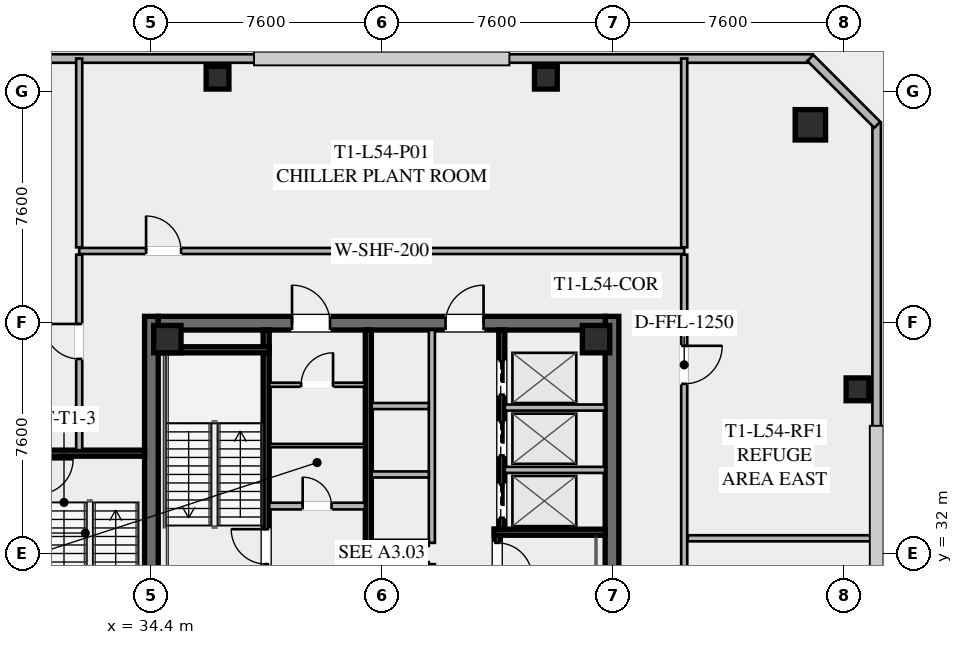
"""IFC4 building model, lengths in metres.
Left out: names, types, materials, properties, quantities, classifications, styles, units other than length and angle.
Written with IfcOpenShell. Run it as: python <this file> out.ifc"""

import sys

from ifc_helpers import new_model, si_unit, direction, frame, frame_2d, origin, origin_2d, place, context, subcontext, project, spatial, rectangle, hollow_rectangle, extrude, element, fill, save


model = new_model("IFC4")
c1 = context("Model", 3, precision=1e-05, world=origin(), true_north=direction((0.0, 1.0)))
c2 = subcontext(c1, "Body", "Model", "MODEL_VIEW")
j1 = project(units=[si_unit("LENGTHUNIT", "METRE"), si_unit("PLANEANGLEUNIT", "RADIAN")], contexts=[c1])
p1 = place(None, origin())
s1 = spatial("IfcSite", under=j1, at=p1, CompositionType="ELEMENT")
p2 = place(p1, origin())
s2 = spatial("IfcBuilding", under=s1, at=p2, CompositionType="ELEMENT")
p3 = place(p2, frame((0.0, 0.0, 199.6)))
s3 = spatial("IfcBuildingStorey", under=s2, at=p3, CompositionType="ELEMENT", Elevation=199.6)
for number, where, z_axis, x_axis in (
    (1, (34.425, 24.2, 0.0), (0.0, 0.0, 1.0), (0.0, 1.0, 0.0)),
    (2, (49.575, 39.8, 0.0), (0.0, 0.0, 1.0), (0.0, -1.0, 0.0)),
):
    element("IfcWall", number, at=place(p3, frame(where, z_axis=z_axis, x_axis=x_axis)), inside=s3, PredefinedType="SHEAR", context=c2, shape_type="SweptSolid", body=[
        extrude(rectangle(XDim=15.6, YDim=0.45, at=frame_2d((7.8, 0.0))), origin(), (0.0, 0.0, 1.0), 4.6),
    ])
p4 = place(p3, frame((34.65, 39.575, 0.0), z_axis=(0.0, 0.0, 1.0), x_axis=(1.0, 0.0, 0.0)))
e3 = element("IfcWall", 3, at=p4, inside=s3, PredefinedType="SHEAR", context=c2, shape_type="SweptSolid", body=[
    extrude(rectangle(XDim=14.7, YDim=0.45, at=frame_2d((7.35, 0.0))), origin(), (0.0, 0.0, 1.0), 4.6),
])
p5 = place(p4, frame((4.4, 0.0, 0.0)))
e4 = element("IfcOpeningElement", 4, at=p5, cuts=e3, PredefinedType="OPENING", context=c2, shape_type="SweptSolid", body=[
    extrude(rectangle(XDim=1.25, YDim=2.25, at=frame_2d((0.625, 1.125))), frame((0.0, 0.235, 0.0), z_axis=(0.0, -1.0, 0.0), x_axis=(1.0, 0.0, 0.0)), (0.0, 0.0, 1.0), 0.47),
])
p6 = place(p4, frame((9.45, 0.0, 0.0)))
e5 = element("IfcOpeningElement", 5, at=p6, cuts=e3, PredefinedType="OPENING", context=c2, shape_type="SweptSolid", body=[
    extrude(rectangle(XDim=1.25, YDim=2.25, at=frame_2d((0.625, 1.125))), frame((0.0, 0.235, 0.0), z_axis=(0.0, -1.0, 0.0), x_axis=(1.0, 0.0, 0.0)), (0.0, 0.0, 1.0), 0.47),
])
for number, where, z_axis, x_axis in (
    (6, (49.05, 39.05, 0.0), (0.0, 0.0, 1.0), (1.0, 0.0, 0.0)),
    (7, (34.95, 39.05, 0.0), (0.0, 0.0, 1.0), (1.0, 0.0, 0.0)),
):
    element("IfcColumn", number, at=place(p3, frame(where, z_axis=z_axis, x_axis=x_axis)), inside=s3, PredefinedType="COLUMN", context=c2, shape_type="SweptSolid", body=[
        extrude(hollow_rectangle(XDim=0.9, YDim=0.9, WallThickness=0.04, at=origin_2d()), origin(), (0.0, 0.0, 1.0), 4.42),
    ])
p7 = place(p3, frame((56.1, 46.1, -0.295), z_axis=(0.0, 0.0, 1.0), x_axis=(1.0, 0.0, 0.0)))
e8 = element("IfcColumn", 8, at=p7, inside=s3, PredefinedType="COLUMN", context=c2, shape_type="SweptSolid", body=[
    extrude(hollow_rectangle(XDim=1.0, YDim=1.0, WallThickness=0.04, at=origin_2d()), origin(), (0.0, 0.0, 1.0), 4.715),
])
for number, where, z_axis, x_axis in (
    (9, (57.65, 37.4, -0.295), (0.0, 0.0, 1.0), (1.0, 0.0, 0.0)),
    (10, (47.4, 47.65, -0.295), (0.0, 0.0, 1.0), (1.0, 0.0, 0.0)),
    (11, (36.6, 47.65, -0.295), (0.0, 0.0, 1.0), (1.0, 0.0, 0.0)),
):
    element("IfcColumn", number, at=place(p3, frame(where, z_axis=z_axis, x_axis=x_axis)), inside=s3, PredefinedType="COLUMN", context=c2, shape_type="SweptSolid", body=[
        extrude(hollow_rectangle(XDim=0.75, YDim=0.75, WallThickness=0.032, at=origin_2d()), origin(), (0.0, 0.0, 1.0), 4.715),
    ])
for number, where, z_axis, x_axis in (
    (12, (27.82, 48.28, 0.0), (0.0, 0.0, 1.0), (1.0, 0.0, 0.0)),
    (13, (58.28, 46.18, 0.0), (0.0, 0.0, 1.0), (0.0, -1.0, 0.0)),
):
    element("IfcWall", number, at=place(p3, frame(where, z_axis=z_axis, x_axis=x_axis)), inside=s3, PredefinedType="SOLIDWALL", context=c2, shape_type="SweptSolid", body=[
        extrude(rectangle(XDim=28.36, YDim=0.28, at=frame_2d((14.18, 0.0))), origin(), (0.0, 0.0, 1.0), 4.42),
    ])
p8 = place(p3, frame((56.1, 48.3, 0.0), z_axis=(0.0, 0.0, 1.0), x_axis=(0.707106781187, -0.707106781187, 0.0)))
e14 = element("IfcWall", 14, at=p8, inside=s3, PredefinedType="SOLIDWALL", context=c2, shape_type="SweptSolid", body=[
    extrude(rectangle(XDim=3.111, YDim=0.28, at=frame_2d((1.556, 0.0))), origin(), (0.0, 0.0, 1.0), 4.42),
])
p9 = place(p3, frame((38.2, 31.2, 0.0), z_axis=(0.0, 0.0, 1.0), x_axis=(0.0, 1.0, 0.0)))
e15 = element("IfcWall", 15, at=p9, inside=s3, PredefinedType="SHEAR", context=c2, shape_type="SweptSolid", body=[
    extrude(rectangle(XDim=8.15, YDim=0.2, at=frame_2d((4.075, 0.0))), origin(), (0.0, 0.0, 1.0), 4.42),
])
p10 = place(p9, frame((0.45, 0.0, 0.0)))
e16 = element("IfcOpeningElement", 16, at=p10, cuts=e15, PredefinedType="OPENING", context=c2, shape_type="SweptSolid", body=[
    extrude(rectangle(XDim=1.15, YDim=2.2, at=frame_2d((0.575, 1.1))), frame((0.0, 0.11, 0.0), z_axis=(0.0, -1.0, 0.0), x_axis=(1.0, 0.0, 0.0)), (0.0, 0.0, 1.0), 0.22),
])
p11 = place(p3, frame((34.65, 38.7, 0.0), z_axis=(0.0, 0.0, 1.0), x_axis=(1.0, 0.0, 0.0)))
e17 = element("IfcWall", 17, at=p11, inside=s3, PredefinedType="SHEAR", context=c2, shape_type="SweptSolid", body=[
    extrude(rectangle(XDim=3.65, YDim=0.2, at=frame_2d((1.825, 0.0))), origin(), (0.0, 0.0, 1.0), 4.42),
])
p12 = place(p3, frame((45.8, 32.8, 0.0), z_axis=(0.0, 0.0, 1.0), x_axis=(0.0, -1.0, 0.0)))
e18 = element("IfcWall", 18, at=p12, inside=s3, PredefinedType="SHEAR", context=c2, shape_type="SweptSolid", body=[
    extrude(rectangle(XDim=8.15, YDim=0.2, at=frame_2d((4.075, 0.0))), origin(), (0.0, 0.0, 1.0), 4.42),
])
p13 = place(p12, frame((0.45, 0.0, 0.0)))
e19 = element("IfcOpeningElement", 19, at=p13, cuts=e18, PredefinedType="OPENING", context=c2, shape_type="SweptSolid", body=[
    extrude(rectangle(XDim=1.15, YDim=2.2, at=frame_2d((0.575, 1.1))), frame((0.0, 0.11, 0.0), z_axis=(0.0, -1.0, 0.0), x_axis=(1.0, 0.0, 0.0)), (0.0, 0.0, 1.0), 0.22),
])
p14 = place(p3, frame((45.7, 32.7, 0.0), z_axis=(0.0, 0.0, 1.0), x_axis=(1.0, 0.0, 0.0)))
e20 = element("IfcWall", 20, at=p14, inside=s3, PredefinedType="SHEAR", context=c2, shape_type="SweptSolid", body=[
    extrude(rectangle(XDim=3.65, YDim=0.2, at=frame_2d((1.825, 0.0))), origin(), (0.0, 0.0, 1.0), 4.42),
])
p15 = place(p3, frame((41.56, 24.65, 0.0), z_axis=(0.0, 0.0, 1.0), x_axis=(0.0, 1.0, 0.0)))
e21 = element("IfcWall", 21, at=p15, inside=s3, PredefinedType="SHEAR", context=c2, shape_type="SweptSolid", body=[
    extrude(rectangle(XDim=14.7, YDim=0.2, at=frame_2d((7.35, 0.0))), origin(), (0.0, 0.0, 1.0), 4.42),
])
p16 = place(p3, frame((38.3, 33.56, 0.0), z_axis=(0.0, 0.0, 1.0), x_axis=(1.0, 0.0, 0.0)))
e22 = element("IfcWall", 22, at=p16, inside=s3, PredefinedType="SOLIDWALL", context=c2, shape_type="SweptSolid", body=[
    extrude(rectangle(XDim=3.15, YDim=0.22, at=frame_2d((1.575, 0.0))), origin(), (0.0, 0.0, 1.0), 3.531),
])
p17 = place(p16, frame((1.1, 0.0, 0.0)))
e23 = element("IfcOpeningElement", 23, at=p17, cuts=e22, PredefinedType="OPENING", context=c2, shape_type="SweptSolid", body=[
    extrude(rectangle(XDim=0.95, YDim=2.05, at=frame_2d((0.475, 1.025))), frame((0.0, 0.12, 0.0), z_axis=(0.0, -1.0, 0.0), x_axis=(1.0, 0.0, 0.0)), (0.0, 0.0, 1.0), 0.24),
])
p18 = place(p3, frame((45.95, 39.35, 0.0), z_axis=(0.0, 0.0, 1.0), x_axis=(0.0, -1.0, 0.0)))
e24 = element("IfcWall", 24, at=p18, inside=s3, PredefinedType="SHEAR", context=c2, shape_type="SweptSolid", body=[
    extrude(rectangle(XDim=6.55, YDim=0.2, at=frame_2d((3.275, 0.0))), origin(), (0.0, 0.0, 1.0), 4.42),
])
p19 = place(p18, frame((5.075, 0.0, 0.0)))
e25 = element("IfcOpeningElement", 25, at=p19, cuts=e24, PredefinedType="OPENING", context=c2, shape_type="SweptSolid", body=[
    extrude(rectangle(XDim=1.1, YDim=2.2, at=frame_2d((0.55, 1.1))), frame((0.0, 0.11, 0.0), z_axis=(0.0, -1.0, 0.0), x_axis=(1.0, 0.0, 0.0)), (0.0, 0.0, 1.0), 0.22),
])
p20 = place(p18, frame((3.025, 0.0, 0.0)))
e26 = element("IfcOpeningElement", 26, at=p20, cuts=e24, PredefinedType="OPENING", context=c2, shape_type="SweptSolid", body=[
    extrude(rectangle(XDim=1.1, YDim=2.2, at=frame_2d((0.55, 1.1))), frame((0.0, 0.11, 0.0), z_axis=(0.0, -1.0, 0.0), x_axis=(1.0, 0.0, 0.0)), (0.0, 0.0, 1.0), 0.22),
])
p21 = place(p18, frame((1.025, 0.0, 0.0)))
e27 = element("IfcOpeningElement", 27, at=p21, cuts=e24, PredefinedType="OPENING", context=c2, shape_type="SweptSolid", body=[
    extrude(rectangle(XDim=1.1, YDim=2.2, at=frame_2d((0.55, 1.1))), frame((0.0, 0.11, 0.0), z_axis=(0.0, -1.0, 0.0), x_axis=(1.0, 0.0, 0.0)), (0.0, 0.0, 1.0), 0.22),
])
for number, where, z_axis, x_axis in (
    (28, (46.05, 34.75, 0.0), (0.0, 0.0, 1.0), (1.0, 0.0, 0.0)),
    (29, (46.05, 36.8, 0.0), (0.0, 0.0, 1.0), (1.0, 0.0, 0.0)),
):
    element("IfcWall", number, at=place(p3, frame(where, z_axis=z_axis, x_axis=x_axis)), inside=s3, PredefinedType="SOLIDWALL", context=c2, shape_type="SweptSolid", body=[
        extrude(rectangle(XDim=3.3, YDim=0.2, at=frame_2d((1.65, 0.0))), origin(), (0.0, 0.0, 1.0), 4.42),
    ])
p22 = place(p3, frame((38.3, 37.55, 0.0), z_axis=(0.0, 0.0, 1.0), x_axis=(1.0, 0.0, 0.0)))
e30 = element("IfcWall", 30, at=p22, inside=s3, PredefinedType="PARTITIONING", context=c2, shape_type="SweptSolid", body=[
    extrude(rectangle(XDim=3.15, YDim=0.135, at=frame_2d((1.575, 0.0))), origin(), (0.0, 0.0, 1.0), 3.531),
])
p23 = place(p22, frame((1.05, 0.0, 0.0)))
e31 = element("IfcOpeningElement", 31, at=p23, cuts=e30, PredefinedType="OPENING", context=c2, shape_type="SweptSolid", body=[
    extrude(rectangle(XDim=1.05, YDim=2.2, at=frame_2d((0.525, 1.1))), frame((0.0, 0.077, 0.0), z_axis=(0.0, -1.0, 0.0), x_axis=(1.0, 0.0, 0.0)), (0.0, 0.0, 1.0), 0.155),
])
p24 = place(p3, frame((38.3, 35.55, 0.0), z_axis=(0.0, 0.0, 1.0), x_axis=(1.0, 0.0, 0.0)))
e32 = element("IfcWall", 32, at=p24, inside=s3, PredefinedType="PARTITIONING", context=c2, shape_type="SweptSolid", body=[
    extrude(rectangle(XDim=3.15, YDim=0.11, at=frame_2d((1.575, 0.0))), origin(), (0.0, 0.0, 1.0), 3.531),
])
p25 = place(p3, frame((43.65, 24.65, 0.0), z_axis=(0.0, 0.0, 1.0), x_axis=(0.0, 1.0, 0.0)))
e33 = element("IfcWall", 33, at=p25, inside=s3, PredefinedType="SOLIDWALL", context=c2, shape_type="SweptSolid", body=[
    extrude(rectangle(XDim=7.0, YDim=0.2, at=frame_2d((3.5, 0.0))), origin(), (0.0, 0.0, 1.0), 3.531),
])
p26 = place(p25, frame((0.85, 0.0, 0.0)))
e34 = element("IfcOpeningElement", 34, at=p26, cuts=e33, PredefinedType="OPENING", context=c2, shape_type="SweptSolid", body=[
    extrude(rectangle(XDim=0.95, YDim=2.05, at=frame_2d((0.475, 1.025))), frame((0.0, 0.11, 0.0), z_axis=(0.0, -1.0, 0.0), x_axis=(1.0, 0.0, 0.0)), (0.0, 0.0, 1.0), 0.22),
])
p27 = place(p25, frame((4.8, 0.0, 0.0)))
e35 = element("IfcOpeningElement", 35, at=p27, cuts=e33, PredefinedType="OPENING", context=c2, shape_type="SweptSolid", body=[
    extrude(rectangle(XDim=1.05, YDim=2.2, at=frame_2d((0.525, 1.1))), frame((0.0, 0.11, 0.0), z_axis=(0.0, -1.0, 0.0), x_axis=(1.0, 0.0, 0.0)), (0.0, 0.0, 1.0), 0.22),
])
p28 = place(p3, frame((41.67, 31.65, 0.0), z_axis=(0.0, 0.0, 1.0), x_axis=(1.0, 0.0, 0.0)))
e36 = element("IfcWall", 36, at=p28, inside=s3, PredefinedType="PARTITIONING", context=c2, shape_type="SweptSolid", body=[
    extrude(rectangle(XDim=1.88, YDim=0.135, at=frame_2d((0.94, 0.0))), origin(), (0.0, 0.0, 1.0), 3.531),
])
p29 = place(p3, frame((43.65, 32.35, 0.0), z_axis=(0.0, 0.0, 1.0), x_axis=(0.0, 1.0, 0.0)))
e37 = element("IfcWall", 37, at=p29, inside=s3, PredefinedType="SOLIDWALL", context=c2, shape_type="SweptSolid", body=[
    extrude(rectangle(XDim=7.0, YDim=0.2, at=frame_2d((3.5, 0.0))), origin(), (0.0, 0.0, 1.0), 4.42),
])
for number, where, z_axis, x_axis in (
    (38, (41.67, 32.35, 0.0), (0.0, 0.0, 1.0), (1.0, 0.0, 0.0)),
    (39, (41.67, 34.6, 0.0), (0.0, 0.0, 1.0), (1.0, 0.0, 0.0)),
    (40, (41.67, 36.85, 0.0), (0.0, 0.0, 1.0), (1.0, 0.0, 0.0)),
):
    element("IfcWall", number, at=place(p3, frame(where, z_axis=z_axis, x_axis=x_axis)), inside=s3, PredefinedType="SOLIDWALL", context=c2, shape_type="SweptSolid", body=[
        extrude(rectangle(XDim=1.88, YDim=0.2, at=frame_2d((0.94, 0.0))), origin(), (0.0, 0.0, 1.0), 4.42),
    ])
p30 = place(p3, frame((34.2, 35.3, 0.0), z_axis=(0.0, 0.0, 1.0), x_axis=(-1.0, 0.0, 0.0)))
e41 = element("IfcWall", 41, at=p30, inside=s3, PredefinedType="SHEAR", context=c2, shape_type="SweptSolid", body=[
    extrude(rectangle(XDim=3.4, YDim=0.2, at=frame_2d((1.7, 0.0))), origin(), (0.0, 0.0, 1.0), 4.42),
])
p31 = place(p3, frame((32.05, 41.95, 0.0), z_axis=(0.0, 0.0, 1.0), x_axis=(1.0, 0.0, 0.0)))
e42 = element("IfcWall", 42, at=p31, inside=s3, PredefinedType="SOLIDWALL", context=c2, shape_type="SweptSolid", body=[
    extrude(rectangle(XDim=19.9, YDim=0.2, at=frame_2d((9.95, 0.0))), origin(), (0.0, 0.0, 1.0), 3.531),
])
p32 = place(p31, frame((2.2, 0.0, 0.0)))
e43 = element("IfcOpeningElement", 43, at=p32, cuts=e42, PredefinedType="OPENING", context=c2, shape_type="SweptSolid", body=[
    extrude(rectangle(XDim=1.15, YDim=2.2, at=frame_2d((0.575, 1.1))), frame((0.0, 0.11, 0.0), z_axis=(0.0, -1.0, 0.0), x_axis=(1.0, 0.0, 0.0)), (0.0, 0.0, 1.0), 0.22),
])
p33 = place(p3, frame((51.95, 41.83, 0.0), z_axis=(0.0, 0.0, 1.0), x_axis=(0.0, -1.0, 0.0)))
e44 = element("IfcWall", 44, at=p33, inside=s3, PredefinedType="SOLIDWALL", context=c2, shape_type="SweptSolid", body=[
    extrude(rectangle(XDim=19.66, YDim=0.2, at=frame_2d((9.83, 0.0))), origin(), (0.0, 0.0, 1.0), 3.531),
])
p34 = place(p33, frame((3.0, 0.0, 0.0)))
e45 = element("IfcOpeningElement", 45, at=p34, cuts=e44, PredefinedType="OPENING", context=c2, shape_type="SweptSolid", body=[
    extrude(rectangle(XDim=1.25, YDim=2.25, at=frame_2d((0.625, 1.125))), frame((0.0, 0.11, 0.0), z_axis=(0.0, -1.0, 0.0), x_axis=(1.0, 0.0, 0.0)), (0.0, 0.0, 1.0), 0.22),
])
p35 = place(p33, frame((13.2, 0.0, 0.0)))
e46 = element("IfcOpeningElement", 46, at=p35, cuts=e44, PredefinedType="OPENING", context=c2, shape_type="SweptSolid", body=[
    extrude(rectangle(XDim=1.15, YDim=2.2, at=frame_2d((0.575, 1.1))), frame((0.0, 0.11, 0.0), z_axis=(0.0, -1.0, 0.0), x_axis=(1.0, 0.0, 0.0)), (0.0, 0.0, 1.0), 0.22),
])
p36 = place(p3, frame((32.05, 35.4, 0.0), z_axis=(0.0, 0.0, 1.0), x_axis=(0.0, 1.0, 0.0)))
e47 = element("IfcWall", 47, at=p36, inside=s3, PredefinedType="SOLIDWALL", context=c2, shape_type="SweptSolid", body=[
    extrude(rectangle(XDim=6.43, YDim=0.2, at=frame_2d((3.215, 0.0))), origin(), (0.0, 0.0, 1.0), 3.531),
])
p37 = place(p36, frame((3.0, 0.0, 0.0)))
e48 = element("IfcOpeningElement", 48, at=p37, cuts=e47, PredefinedType="OPENING", context=c2, shape_type="SweptSolid", body=[
    extrude(rectangle(XDim=1.15, YDim=2.2, at=frame_2d((0.575, 1.1))), frame((0.0, 0.11, 0.0), z_axis=(0.0, -1.0, 0.0), x_axis=(1.0, 0.0, 0.0)), (0.0, 0.0, 1.0), 0.22),
])
for number, where, z_axis, x_axis in (
    (49, (32.05, 42.07, 0.0), (0.0, 0.0, 1.0), (0.0, 1.0, 0.0)),
    (50, (51.95, 42.07, 0.0), (0.0, 0.0, 1.0), (0.0, 1.0, 0.0)),
    (51, (52.07, 32.5, 0.0), (0.0, 0.0, 1.0), (1.0, 0.0, 0.0)),
):
    element("IfcWall", number, at=place(p3, frame(where, z_axis=z_axis, x_axis=x_axis)), inside=s3, PredefinedType="SOLIDWALL", context=c2, shape_type="SweptSolid", body=[
        extrude(rectangle(XDim=6.21, YDim=0.2, at=frame_2d((3.105, 0.0))), origin(), (0.0, 0.0, 1.0), 3.531),
    ])
p38 = place(p5, origin())
e52 = element("IfcDoor", 52, at=p38, inside=s3, OperationType="SINGLE_SWING_LEFT", PredefinedType="DOOR", context=c2, shape_type="SweptSolid", body=[
    extrude(rectangle(XDim=1.25, YDim=2.25, at=frame_2d((0.625, 1.125))), frame((0.0, 0.025, 0.0), z_axis=(0.0, -1.0, 0.0), x_axis=(1.0, 0.0, 0.0)), (0.0, 0.0, 1.0), 0.05),
])
fill(e4, e52)
p39 = place(p6, origin())
e53 = element("IfcDoor", 53, at=p39, inside=s3, OperationType="SINGLE_SWING_RIGHT", PredefinedType="DOOR", context=c2, shape_type="SweptSolid", body=[
    extrude(rectangle(XDim=1.25, YDim=2.25, at=frame_2d((0.625, 1.125))), frame((0.0, 0.025, 0.0), z_axis=(0.0, -1.0, 0.0), x_axis=(1.0, 0.0, 0.0)), (0.0, 0.0, 1.0), 0.05),
])
fill(e5, e53)
p40 = place(p10, origin())
e54 = element("IfcDoor", 54, at=p40, inside=s3, OperationType="SINGLE_SWING_RIGHT", PredefinedType="DOOR", context=c2, shape_type="SweptSolid", body=[
    extrude(rectangle(XDim=1.15, YDim=2.2, at=frame_2d((0.575, 1.1))), frame((0.0, 0.025, 0.0), z_axis=(0.0, -1.0, 0.0), x_axis=(1.0, 0.0, 0.0)), (0.0, 0.0, 1.0), 0.05),
])
fill(e16, e54)
p41 = place(p13, origin())
e55 = element("IfcDoor", 55, at=p41, inside=s3, OperationType="SINGLE_SWING_RIGHT", PredefinedType="DOOR", context=c2, shape_type="SweptSolid", body=[
    extrude(rectangle(XDim=1.15, YDim=2.2, at=frame_2d((0.575, 1.1))), frame((0.0, 0.025, 0.0), z_axis=(0.0, -1.0, 0.0), x_axis=(1.0, 0.0, 0.0)), (0.0, 0.0, 1.0), 0.05),
])
fill(e19, e55)
p42 = place(p23, origin())
e56 = element("IfcDoor", 56, at=p42, inside=s3, OperationType="SINGLE_SWING_RIGHT", PredefinedType="DOOR", context=c2, shape_type="SweptSolid", body=[
    extrude(rectangle(XDim=1.05, YDim=2.2, at=frame_2d((0.525, 1.1))), frame((0.0, 0.025, 0.0), z_axis=(0.0, -1.0, 0.0), x_axis=(1.0, 0.0, 0.0)), (0.0, 0.0, 1.0), 0.05),
])
fill(e31, e56)
p43 = place(p17, origin())
e57 = element("IfcDoor", 57, at=p43, inside=s3, OperationType="SINGLE_SWING_LEFT", PredefinedType="DOOR", context=c2, shape_type="SweptSolid", body=[
    extrude(rectangle(XDim=0.95, YDim=2.05, at=frame_2d((0.475, 1.025))), frame((0.0, 0.025, 0.0), z_axis=(0.0, -1.0, 0.0), x_axis=(1.0, 0.0, 0.0)), (0.0, 0.0, 1.0), 0.05),
])
fill(e23, e57)
p44 = place(p32, origin())
e58 = element("IfcDoor", 58, at=p44, inside=s3, OperationType="SINGLE_SWING_LEFT", PredefinedType="DOOR", context=c2, shape_type="SweptSolid", body=[
    extrude(rectangle(XDim=1.15, YDim=2.2, at=frame_2d((0.575, 1.1))), frame((0.0, 0.025, 0.0), z_axis=(0.0, -1.0, 0.0), x_axis=(1.0, 0.0, 0.0)), (0.0, 0.0, 1.0), 0.05),
])
fill(e43, e58)
p45 = place(p34, origin())
e59 = element("IfcDoor", 59, at=p45, inside=s3, OperationType="SINGLE_SWING_LEFT", PredefinedType="DOOR", context=c2, shape_type="SweptSolid", body=[
    extrude(rectangle(XDim=1.25, YDim=2.25, at=frame_2d((0.625, 1.125))), frame((0.0, 0.025, 0.0), z_axis=(0.0, -1.0, 0.0), x_axis=(1.0, 0.0, 0.0)), (0.0, 0.0, 1.0), 0.05),
])
fill(e45, e59)
p46 = place(p37, origin())
e60 = element("IfcDoor", 60, at=p46, inside=s3, OperationType="SINGLE_SWING_RIGHT", PredefinedType="DOOR", context=c2, shape_type="SweptSolid", body=[
    extrude(rectangle(XDim=1.15, YDim=2.2, at=frame_2d((0.575, 1.1))), frame((0.0, 0.025, 0.0), z_axis=(0.0, -1.0, 0.0), x_axis=(1.0, 0.0, 0.0)), (0.0, 0.0, 1.0), 0.05),
])
fill(e48, e60)
p47 = place(p19, origin())
e61 = element("IfcDoor", 61, at=p47, inside=s3, OperationType="SLIDING_TO_LEFT", PredefinedType="DOOR", context=c2, shape_type="SweptSolid", body=[
    extrude(rectangle(XDim=1.1, YDim=2.2, at=frame_2d((0.55, 1.1))), frame((0.0, 0.025, 0.0), z_axis=(0.0, -1.0, 0.0), x_axis=(1.0, 0.0, 0.0)), (0.0, 0.0, 1.0), 0.05),
])
fill(e25, e61)
p48 = place(p20, origin())
e62 = element("IfcDoor", 62, at=p48, inside=s3, OperationType="SLIDING_TO_LEFT", PredefinedType="DOOR", context=c2, shape_type="SweptSolid", body=[
    extrude(rectangle(XDim=1.1, YDim=2.2, at=frame_2d((0.55, 1.1))), frame((0.0, 0.025, 0.0), z_axis=(0.0, -1.0, 0.0), x_axis=(1.0, 0.0, 0.0)), (0.0, 0.0, 1.0), 0.05),
])
fill(e26, e62)
p49 = place(p21, origin())
e63 = element("IfcDoor", 63, at=p49, inside=s3, OperationType="SLIDING_TO_LEFT", PredefinedType="DOOR", context=c2, shape_type="SweptSolid", body=[
    extrude(rectangle(XDim=1.1, YDim=2.2, at=frame_2d((0.55, 1.1))), frame((0.0, 0.025, 0.0), z_axis=(0.0, -1.0, 0.0), x_axis=(1.0, 0.0, 0.0)), (0.0, 0.0, 1.0), 0.05),
])
fill(e27, e63)
save(model, sys.argv[1])
